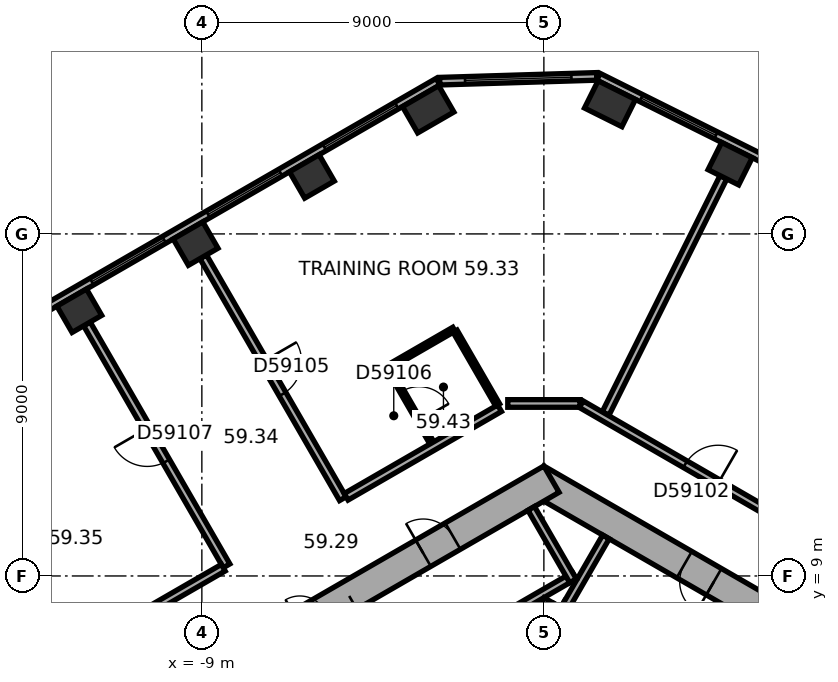
"""IFC4 building model, lengths in metres.
Left out: names, types, materials, properties, quantities, classifications, styles, units other than length and angle.
Written with IfcOpenShell. Run it as: python <this file> out.ifc"""

import sys

from ifc_helpers import new_model, si_unit, direction, frame, frame_2d, origin, origin_2d, place, context, subcontext, project, spatial, rectangle, extrude, element, fill, save


model = new_model("IFC4")
c1 = context("Model", 3, precision=1e-05, world=origin(), true_north=direction((0.0, 1.0)))
c2 = subcontext(c1, "Body", "Model", "MODEL_VIEW")
j1 = project(units=[si_unit("LENGTHUNIT", "METRE"), si_unit("PLANEANGLEUNIT", "RADIAN")], contexts=[c1])
p1 = place(None, origin())
s1 = spatial("IfcSite", under=j1, at=p1, CompositionType="ELEMENT")
p2 = place(p1, origin())
s2 = spatial("IfcBuilding", under=s1, at=p2, CompositionType="ELEMENT")
p3 = place(p2, frame((0.0, 0.0, 240.2)))
s3 = spatial("IfcBuildingStorey", under=s2, at=p3, CompositionType="ELEMENT", Elevation=240.2)
p4 = place(p3, frame((4.902, 19.848, 0.0), z_axis=(0.0, 0.0, 1.0), x_axis=(-0.894934361602, 0.44619781311, 0.0)))
e1 = element("IfcColumn", 1, at=p4, inside=s3, PredefinedType="COLUMN", context=c2, shape_type="SweptSolid", body=[
    extrude(rectangle(XDim=0.9, YDim=0.8, at=origin_2d()), origin(), (0.0, 0.0, 1.0), 3.7),
])
for number, where, z_axis, x_axis in (
    (2, (1.74, 21.425, 0.0), (0.0, 0.0, 1.0), (-0.895, 0.446, 0.0)),
    (3, (-3.044, 21.279, 0.0), (0.0, 0.0, 1.0), (-0.866, -0.5, 0.0)),
):
    element("IfcColumn", number, at=place(p3, frame(where, z_axis=z_axis, x_axis=x_axis)), inside=s3, PredefinedType="COLUMN", context=c2, shape_type="SweptSolid", body=[
        extrude(rectangle(XDim=1.1, YDim=0.8, at=origin_2d()), origin(), (0.0, 0.0, 1.0), 3.7),
    ])
for number, where, z_axis, x_axis in (
    (4, (-6.104, 19.512, 0.0), (0.0, 0.0, 1.0), (-0.866, -0.5, 0.0)),
    (5, (-9.165, 17.745, 0.0), (0.0, 0.0, 1.0), (-0.866, -0.5, 0.0)),
    (6, (-12.225, 15.978, 0.0), (0.0, 0.0, 1.0), (-0.866, -0.5, 0.0)),
):
    element("IfcColumn", number, at=place(p3, frame(where, z_axis=z_axis, x_axis=x_axis)), inside=s3, PredefinedType="COLUMN", context=c2, shape_type="SweptSolid", body=[
        extrude(rectangle(XDim=0.9, YDim=0.8, at=origin_2d()), origin(), (0.0, 0.0, 1.0), 3.7),
    ])
p5 = place(p3, frame((10.1, 5.6, 0.0), z_axis=(0.0, 0.0, 1.0), x_axis=(-0.866023897231, 0.500002609418, 0.0)))
e7 = element("IfcWall", 7, at=p5, inside=s3, PredefinedType="SHEAR", context=c2, shape_type="SweptSolid", body=[
    extrude(rectangle(XDim=11.894, YDim=0.8, at=frame_2d((5.947, 0.0))), origin(), (0.0, 0.0, 1.0), 3.7),
])
p6 = place(p5, frame((2.597, 0.0, 0.0)))
e8 = element("IfcOpeningElement", 8, at=p6, cuts=e7, PredefinedType="OPENING", context=c2, shape_type="SweptSolid", body=[
    extrude(rectangle(XDim=0.9, YDim=2.1, at=frame_2d((0.45, 1.05))), frame((0.0, 0.41, 0.0), z_axis=(0.0, -1.0, 0.0), x_axis=(1.0, 0.0, 0.0)), (0.0, 0.0, 1.0), 0.82),
])
p7 = place(p5, frame((6.497, 0.0, 0.0)))
e9 = element("IfcOpeningElement", 9, at=p7, cuts=e7, PredefinedType="OPENING", context=c2, shape_type="SweptSolid", body=[
    extrude(rectangle(XDim=0.9, YDim=2.1, at=frame_2d((0.45, 1.05))), frame((0.0, 0.41, 0.0), z_axis=(0.0, -1.0, 0.0), x_axis=(1.0, 0.0, 0.0)), (0.0, 0.0, 1.0), 0.82),
])
p8 = place(p3, frame((0.2, 11.547, 0.0), z_axis=(0.0, 0.0, 1.0), x_axis=(-0.866023897231, -0.500002609418, 0.0)))
e10 = element("IfcWall", 10, at=p8, inside=s3, PredefinedType="SHEAR", context=c2, shape_type="SweptSolid", body=[
    extrude(rectangle(XDim=11.894, YDim=0.8, at=frame_2d((5.947, 0.0))), origin(), (0.0, 0.0, 1.0), 3.7),
])
p9 = place(p8, frame((6.147, 0.0, 0.0)))
e11 = element("IfcOpeningElement", 11, at=p9, cuts=e10, PredefinedType="OPENING", context=c2, shape_type="SweptSolid", body=[
    extrude(rectangle(XDim=1.5, YDim=2.1, at=frame_2d((0.75, 1.05))), frame((0.0, 0.41, 0.0), z_axis=(0.0, -1.0, 0.0), x_axis=(1.0, 0.0, 0.0)), (0.0, 0.0, 1.0), 0.82),
])
p10 = place(p8, frame((2.997, 0.0, 0.0)))
e12 = element("IfcOpeningElement", 12, at=p10, cuts=e10, PredefinedType="OPENING", context=c2, shape_type="SweptSolid", body=[
    extrude(rectangle(XDim=0.9, YDim=2.1, at=frame_2d((0.45, 1.05))), frame((0.0, 0.41, 0.0), z_axis=(0.0, -1.0, 0.0), x_axis=(1.0, 0.0, 0.0)), (0.0, 0.0, 1.0), 0.82),
])
p11 = place(p3, frame((18.299, 13.727, 0.0), z_axis=(0.0, 0.0, 1.0), x_axis=(-0.894934554817, 0.44619742558, 0.0)))
e13 = element("IfcWall", 13, at=p11, inside=s3, PredefinedType="STANDARD", context=c2, shape_type="SweptSolid", body=[
    extrude(rectangle(XDim=18.841, YDim=0.2, at=frame_2d((9.421, 0.0))), origin(), (0.0, 0.0, 1.0), 3.7),
])
p12 = place(p11, frame((1.253, 0.0, 0.9)))
e14 = element("IfcOpeningElement", 14, at=p12, cuts=e13, PredefinedType="OPENING", context=c2, shape_type="SweptSolid", body=[
    extrude(rectangle(XDim=2.2, YDim=2.0, at=frame_2d((1.1, 1.0))), frame((0.0, 0.11, 0.0), z_axis=(0.0, -1.0, 0.0), x_axis=(1.0, 0.0, 0.0)), (0.0, 0.0, 1.0), 0.22),
])
p13 = place(p11, frame((4.786, 0.0, 0.9)))
e15 = element("IfcOpeningElement", 15, at=p13, cuts=e13, PredefinedType="OPENING", context=c2, shape_type="SweptSolid", body=[
    extrude(rectangle(XDim=2.2, YDim=2.0, at=frame_2d((1.1, 1.0))), frame((0.0, 0.11, 0.0), z_axis=(0.0, -1.0, 0.0), x_axis=(1.0, 0.0, 0.0)), (0.0, 0.0, 1.0), 0.22),
])
p14 = place(p11, frame((8.32, 0.0, 0.9)))
e16 = element("IfcOpeningElement", 16, at=p14, cuts=e13, PredefinedType="OPENING", context=c2, shape_type="SweptSolid", body=[
    extrude(rectangle(XDim=2.2, YDim=2.0, at=frame_2d((1.1, 1.0))), frame((0.0, 0.11, 0.0), z_axis=(0.0, -1.0, 0.0), x_axis=(1.0, 0.0, 0.0)), (0.0, 0.0, 1.0), 0.22),
])
p15 = place(p11, frame((11.854, 0.0, 0.9)))
e17 = element("IfcOpeningElement", 17, at=p15, cuts=e13, PredefinedType="OPENING", context=c2, shape_type="SweptSolid", body=[
    extrude(rectangle(XDim=2.2, YDim=2.0, at=frame_2d((1.1, 1.0))), frame((0.0, 0.11, 0.0), z_axis=(0.0, -1.0, 0.0), x_axis=(1.0, 0.0, 0.0)), (0.0, 0.0, 1.0), 0.22),
])
p16 = place(p11, frame((15.387, 0.0, 0.9)))
e18 = element("IfcOpeningElement", 18, at=p16, cuts=e13, PredefinedType="OPENING", context=c2, shape_type="SweptSolid", body=[
    extrude(rectangle(XDim=2.2, YDim=2.0, at=frame_2d((1.1, 1.0))), frame((0.0, 0.11, 0.0), z_axis=(0.0, -1.0, 0.0), x_axis=(1.0, 0.0, 0.0)), (0.0, 0.0, 1.0), 0.22),
])
p17 = place(p3, frame((1.389, 22.145, 0.0), z_axis=(0.0, 0.0, 1.0), x_axis=(-0.999534702881, -0.030502093955, 0.0)))
e19 = element("IfcWall", 19, at=p17, inside=s3, PredefinedType="STANDARD", context=c2, shape_type="SweptSolid", body=[
    extrude(rectangle(XDim=4.13, YDim=0.2, at=frame_2d((2.065, 0.0))), origin(), (0.0, 0.0, 1.0), 3.7),
])
p18 = place(p17, frame((0.665, 0.0, 0.9)))
e20 = element("IfcOpeningElement", 20, at=p18, cuts=e19, PredefinedType="OPENING", context=c2, shape_type="SweptSolid", body=[
    extrude(rectangle(XDim=2.8, YDim=2.0, at=frame_2d((1.4, 1.0))), frame((0.0, 0.11, 0.0), z_axis=(0.0, -1.0, 0.0), x_axis=(1.0, 0.0, 0.0)), (0.0, 0.0, 1.0), 0.22),
])
p19 = place(p3, frame((-2.786, 22.005, 0.0), z_axis=(0.0, 0.0, 1.0), x_axis=(-0.866026555358, -0.49999800541, 0.0)))
e21 = element("IfcWall", 21, at=p19, inside=s3, PredefinedType="STANDARD", context=c2, shape_type="SweptSolid", body=[
    extrude(rectangle(XDim=18.841, YDim=0.2, at=frame_2d((9.421, 0.0))), origin(), (0.0, 0.0, 1.0), 3.7),
])
p20 = place(p19, frame((1.254, 0.0, 0.9)))
e22 = element("IfcOpeningElement", 22, at=p20, cuts=e21, PredefinedType="OPENING", context=c2, shape_type="SweptSolid", body=[
    extrude(rectangle(XDim=2.2, YDim=2.0, at=frame_2d((1.1, 1.0))), frame((0.0, 0.11, 0.0), z_axis=(0.0, -1.0, 0.0), x_axis=(1.0, 0.0, 0.0)), (0.0, 0.0, 1.0), 0.22),
])
p21 = place(p19, frame((4.788, 0.0, 0.9)))
e23 = element("IfcOpeningElement", 23, at=p21, cuts=e21, PredefinedType="OPENING", context=c2, shape_type="SweptSolid", body=[
    extrude(rectangle(XDim=2.2, YDim=2.0, at=frame_2d((1.1, 1.0))), frame((0.0, 0.11, 0.0), z_axis=(0.0, -1.0, 0.0), x_axis=(1.0, 0.0, 0.0)), (0.0, 0.0, 1.0), 0.22),
])
p22 = place(p19, frame((8.321, 0.0, 0.9)))
e24 = element("IfcOpeningElement", 24, at=p22, cuts=e21, PredefinedType="OPENING", context=c2, shape_type="SweptSolid", body=[
    extrude(rectangle(XDim=2.2, YDim=2.0, at=frame_2d((1.1, 1.0))), frame((0.0, 0.11, 0.0), z_axis=(0.0, -1.0, 0.0), x_axis=(1.0, 0.0, 0.0)), (0.0, 0.0, 1.0), 0.22),
])
p23 = place(p19, frame((11.855, 0.0, 0.9)))
e25 = element("IfcOpeningElement", 25, at=p23, cuts=e21, PredefinedType="OPENING", context=c2, shape_type="SweptSolid", body=[
    extrude(rectangle(XDim=2.2, YDim=2.0, at=frame_2d((1.1, 1.0))), frame((0.0, 0.11, 0.0), z_axis=(0.0, -1.0, 0.0), x_axis=(1.0, 0.0, 0.0)), (0.0, 0.0, 1.0), 0.22),
])
p24 = place(p19, frame((15.389, 0.0, 0.9)))
e26 = element("IfcOpeningElement", 26, at=p24, cuts=e21, PredefinedType="OPENING", context=c2, shape_type="SweptSolid", body=[
    extrude(rectangle(XDim=2.2, YDim=2.0, at=frame_2d((1.1, 1.0))), frame((0.0, 0.11, 0.0), z_axis=(0.0, -1.0, 0.0), x_axis=(1.0, 0.0, 0.0)), (0.0, 0.0, 1.0), 0.22),
])
p25 = place(p3, frame((7.424, 4.259, 0.0), z_axis=(0.0, 0.0, 1.0), x_axis=(-0.866026010844, 0.49999894854, 0.0)))
e27 = element("IfcWall", 27, at=p25, inside=s3, PredefinedType="PARTITIONING", context=c2, shape_type="SweptSolid", body=[
    extrude(rectangle(XDim=8.0, YDim=0.2, at=frame_2d((4.0, 0.0))), origin(), (0.0, 0.0, 1.0), 3.42),
])
p26 = place(p3, frame((0.532, 8.122, 0.0), z_axis=(0.0, 0.0, 1.0), x_axis=(0.500077893725, 0.86598042715, 0.0)))
e28 = element("IfcWall", 28, at=p26, inside=s3, PredefinedType="PARTITIONING", context=c2, shape_type="SweptSolid", body=[
    extrude(rectangle(XDim=2.2, YDim=0.2, at=frame_2d((1.1, 0.0))), origin(), (0.0, 0.0, 1.0), 3.42),
])
p27 = place(p3, frame((0.803, 9.009, 0.0), z_axis=(0.0, 0.0, 1.0), x_axis=(-0.866028230842, -0.499995103361, 0.0)))
e29 = element("IfcWall", 29, at=p27, inside=s3, PredefinedType="PARTITIONING", context=c2, shape_type="SweptSolid", body=[
    extrude(rectangle(XDim=5.4, YDim=0.2, at=frame_2d((2.7, 0.0))), origin(), (0.0, 0.0, 1.0), 3.42),
])
p28 = place(p3, frame((0.767, 8.872, 0.0), z_axis=(0.0, 0.0, 1.0), x_axis=(-0.499994660107, 0.866028486751, 0.0)))
e30 = element("IfcWall", 30, at=p28, inside=s3, PredefinedType="PARTITIONING", context=c2, shape_type="SweptSolid", body=[
    extrude(rectangle(XDim=2.2, YDim=0.2, at=frame_2d((1.1, 0.0))), origin(), (0.0, 0.0, 1.0), 3.42),
])
p29 = place(p3, frame((-2.216, 4.282, 0.0), z_axis=(0.0, 0.0, 1.0), x_axis=(0.499977259774, 0.866038532462, 0.0)))
e31 = element("IfcWall", 31, at=p29, inside=s3, PredefinedType="SHEAR", context=c2, shape_type="SweptSolid", body=[
    extrude(rectangle(XDim=4.7, YDim=0.3, at=frame_2d((2.35, 0.0))), origin(), (0.0, 0.0, 1.0), 3.42),
])
p30 = place(p3, frame((-12.025, 15.632, 0.0), z_axis=(0.0, 0.0, 1.0), x_axis=(0.499983153418, -0.866035129944, 0.0)))
e32 = element("IfcWall", 32, at=p30, inside=s3, PredefinedType="PARTITIONING", context=c2, shape_type="SweptSolid", body=[
    extrude(rectangle(XDim=7.35, YDim=0.2, at=frame_2d((3.675, 0.0))), origin(), (0.0, 0.0, 1.0), 3.42),
])
p31 = place(p30, frame((3.175, 0.0, 0.0)))
e33 = element("IfcOpeningElement", 33, at=p31, cuts=e32, PredefinedType="OPENING", context=c2, shape_type="SweptSolid", body=[
    extrude(rectangle(XDim=1.0, YDim=2.1, at=frame_2d((0.5, 1.05))), frame((0.0, 0.11, 0.0), z_axis=(0.0, -1.0, 0.0), x_axis=(1.0, 0.0, 0.0)), (0.0, 0.0, 1.0), 0.22),
])
p32 = place(p3, frame((-8.965, 17.399, 0.0), z_axis=(0.0, 0.0, 1.0), x_axis=(0.499993683172, -0.866029050776, 0.0)))
e34 = element("IfcWall", 34, at=p32, inside=s3, PredefinedType="PARTITIONING", context=c2, shape_type="SweptSolid", body=[
    extrude(rectangle(XDim=7.35, YDim=0.2, at=frame_2d((3.675, 0.0))), origin(), (0.0, 0.0, 1.0), 2.87),
])
p33 = place(p32, frame((3.175, 0.0, 0.0)))
e35 = element("IfcOpeningElement", 35, at=p33, cuts=e34, PredefinedType="OPENING", context=c2, shape_type="SweptSolid", body=[
    extrude(rectangle(XDim=1.0, YDim=2.1, at=frame_2d((0.5, 1.05))), frame((0.0, 0.11, 0.0), z_axis=(0.0, -1.0, 0.0), x_axis=(1.0, 0.0, 0.0)), (0.0, 0.0, 1.0), 0.22),
])
p34 = place(p3, frame((-8.437, 9.217, 0.0), z_axis=(0.0, 0.0, 1.0), x_axis=(-0.866005660673, -0.500034194513, 0.0)))
e36 = element("IfcWall", 36, at=p34, inside=s3, PredefinedType="PARTITIONING", context=c2, shape_type="SweptSolid", body=[
    extrude(rectangle(XDim=3.209, YDim=0.2, at=frame_2d((1.604, 0.0))), origin(), (0.0, 0.0, 1.0), 3.42),
])
p35 = place(p3, frame((-4.099, 14.492, 0.0), z_axis=(0.0, 0.0, 1.0), x_axis=(0.866041268327, 0.499972520799, 0.0)))
e37 = element("IfcWall", 37, at=p35, inside=s3, PredefinedType="PARTITIONING", context=c2, shape_type="SweptSolid", body=[
    extrude(rectangle(XDim=2.0, YDim=0.12, at=frame_2d((1.0, 0.0))), origin(), (0.0, 0.0, 1.0), 3.42),
])
p36 = place(p3, frame((-2.948, 12.5, 0.0), z_axis=(0.0, 0.0, 1.0), x_axis=(-0.500077830873, 0.865980463445, 0.0)))
e38 = element("IfcWall", 38, at=p36, inside=s3, PredefinedType="PARTITIONING", context=c2, shape_type="SweptSolid", body=[
    extrude(rectangle(XDim=2.24, YDim=0.12, at=frame_2d((1.12, 0.0))), origin(), (0.0, 0.0, 1.0), 3.42),
])
p37 = place(p36, frame((0.67, 0.0, 0.0)))
e39 = element("IfcOpeningElement", 39, at=p37, cuts=e38, PredefinedType="OPENING", context=c2, shape_type="SweptSolid", body=[
    extrude(rectangle(XDim=0.9, YDim=2.1, at=frame_2d((0.45, 1.05))), frame((0.0, 0.07, 0.0), z_axis=(0.0, -1.0, 0.0), x_axis=(1.0, 0.0, 0.0)), (0.0, 0.0, 1.0), 0.14),
])
p38 = place(p3, frame((-2.336, 15.44, 0.0), z_axis=(0.0, 0.0, 1.0), x_axis=(0.49999608499, -0.866027664105, 0.0)))
e40 = element("IfcWall", 40, at=p38, inside=s3, PredefinedType="PARTITIONING", context=c2, shape_type="SweptSolid", body=[
    extrude(rectangle(XDim=2.24, YDim=0.12, at=frame_2d((1.12, 0.0))), origin(), (0.0, 0.0, 1.0), 3.42),
])
p39 = place(p3, frame((-1.167, 13.414, 0.0), z_axis=(0.0, 0.0, 1.0), x_axis=(-0.866023347809, -0.500003561037, 0.0)))
e41 = element("IfcWall", 41, at=p39, inside=s3, PredefinedType="PARTITIONING", context=c2, shape_type="SweptSolid", body=[
    extrude(rectangle(XDim=4.661, YDim=0.2, at=frame_2d((2.331, 0.0))), origin(), (0.0, 0.0, 1.0), 3.42),
])
p40 = place(p3, frame((0.95, 13.539, 0.0), z_axis=(0.0, 0.0, 1.0), x_axis=(-1.0, 0.0, 0.0)))
e42 = element("IfcWall", 42, at=p40, inside=s3, PredefinedType="PARTITIONING", context=c2, shape_type="SweptSolid", body=[
    extrude(rectangle(XDim=1.9, YDim=0.2, at=frame_2d((0.95, 0.0))), origin(), (0.0, 0.0, 1.0), 3.42),
])
p41 = place(p3, frame((4.723, 19.49, 0.0), z_axis=(0.0, 0.0, 1.0), x_axis=(-0.446186614574, -0.894939944898, 0.0)))
e43 = element("IfcWall", 43, at=p41, inside=s3, PredefinedType="PARTITIONING", context=c2, shape_type="SweptSolid", body=[
    extrude(rectangle(XDim=6.944, YDim=0.2, at=frame_2d((3.472, 0.0))), origin(), (0.0, 0.0, 1.0), 2.87),
])
p42 = place(p3, frame((9.198, 8.777, 0.0), z_axis=(0.0, 0.0, 1.0), x_axis=(-0.866026106692, 0.499998782526, 0.0)))
e44 = element("IfcWall", 44, at=p42, inside=s3, PredefinedType="PARTITIONING", context=c2, shape_type="SweptSolid", body=[
    extrude(rectangle(XDim=9.483, YDim=0.2, at=frame_2d((4.742, 0.0))), origin(), (0.0, 0.0, 1.0), 3.42),
])
p43 = place(p42, frame((5.325, 0.0, 0.0)))
e45 = element("IfcOpeningElement", 45, at=p43, cuts=e44, PredefinedType="OPENING", context=c2, shape_type="SweptSolid", body=[
    extrude(rectangle(XDim=1.0, YDim=2.1, at=frame_2d((0.5, 1.05))), frame((0.0, 0.11, 0.0), z_axis=(0.0, -1.0, 0.0), x_axis=(1.0, 0.0, 0.0)), (0.0, 0.0, 1.0), 0.22),
])
p44 = place(p16, origin())
e46 = element("IfcWindow", 46, at=p44, inside=s3, PartitioningType="SINGLE_PANEL", PredefinedType="WINDOW", context=c2, shape_type="SweptSolid", body=[
    extrude(rectangle(XDim=2.2, YDim=2.0, at=frame_2d((1.1, 1.0))), frame((0.0, 0.03, 0.0), z_axis=(0.0, -1.0, 0.0), x_axis=(1.0, 0.0, 0.0)), (0.0, 0.0, 1.0), 0.06),
])
fill(e18, e46)
p45 = place(p18, origin())
e47 = element("IfcWindow", 47, at=p45, inside=s3, PartitioningType="SINGLE_PANEL", PredefinedType="WINDOW", context=c2, shape_type="SweptSolid", body=[
    extrude(rectangle(XDim=2.8, YDim=2.0, at=frame_2d((1.4, 1.0))), frame((0.0, 0.03, 0.0), z_axis=(0.0, -1.0, 0.0), x_axis=(1.0, 0.0, 0.0)), (0.0, 0.0, 1.0), 0.06),
])
fill(e20, e47)
p46 = place(p20, origin())
e48 = element("IfcWindow", 48, at=p46, inside=s3, PartitioningType="SINGLE_PANEL", PredefinedType="WINDOW", context=c2, shape_type="SweptSolid", body=[
    extrude(rectangle(XDim=2.2, YDim=2.0, at=frame_2d((1.1, 1.0))), frame((0.0, 0.03, 0.0), z_axis=(0.0, -1.0, 0.0), x_axis=(1.0, 0.0, 0.0)), (0.0, 0.0, 1.0), 0.06),
])
fill(e22, e48)
p47 = place(p21, origin())
e49 = element("IfcWindow", 49, at=p47, inside=s3, PartitioningType="SINGLE_PANEL", PredefinedType="WINDOW", context=c2, shape_type="SweptSolid", body=[
    extrude(rectangle(XDim=2.2, YDim=2.0, at=frame_2d((1.1, 1.0))), frame((0.0, 0.03, 0.0), z_axis=(0.0, -1.0, 0.0), x_axis=(1.0, 0.0, 0.0)), (0.0, 0.0, 1.0), 0.06),
])
fill(e23, e49)
p48 = place(p22, origin())
e50 = element("IfcWindow", 50, at=p48, inside=s3, PartitioningType="SINGLE_PANEL", PredefinedType="WINDOW", context=c2, shape_type="SweptSolid", body=[
    extrude(rectangle(XDim=2.2, YDim=2.0, at=frame_2d((1.1, 1.0))), frame((0.0, 0.03, 0.0), z_axis=(0.0, -1.0, 0.0), x_axis=(1.0, 0.0, 0.0)), (0.0, 0.0, 1.0), 0.06),
])
fill(e24, e50)
p49 = place(p9, origin())
e51 = element("IfcDoor", 51, at=p49, inside=s3, OperationType="DOUBLE_DOOR_SINGLE_SWING", PredefinedType="DOOR", context=c2, shape_type="SweptSolid", body=[
    extrude(rectangle(XDim=1.5, YDim=2.1, at=frame_2d((0.75, 1.05))), frame((0.0, 0.025, 0.0), z_axis=(0.0, -1.0, 0.0), x_axis=(1.0, 0.0, 0.0)), (0.0, 0.0, 1.0), 0.05),
])
fill(e11, e51)
p50 = place(p7, origin())
e52 = element("IfcDoor", 52, at=p50, inside=s3, OperationType="SINGLE_SWING_LEFT", PredefinedType="DOOR", context=c2, shape_type="SweptSolid", body=[
    extrude(rectangle(XDim=0.9, YDim=2.1, at=frame_2d((0.45, 1.05))), frame((0.0, 0.025, 0.0), z_axis=(0.0, -1.0, 0.0), x_axis=(1.0, 0.0, 0.0)), (0.0, 0.0, 1.0), 0.05),
])
fill(e9, e52)
p51 = place(p10, origin())
e53 = element("IfcDoor", 53, at=p51, inside=s3, OperationType="SINGLE_SWING_LEFT", PredefinedType="DOOR", context=c2, shape_type="SweptSolid", body=[
    extrude(rectangle(XDim=0.9, YDim=2.1, at=frame_2d((0.45, 1.05))), frame((0.0, 0.025, 0.0), z_axis=(0.0, -1.0, 0.0), x_axis=(1.0, 0.0, 0.0)), (0.0, 0.0, 1.0), 0.05),
])
fill(e12, e53)
p52 = place(p43, origin())
e54 = element("IfcDoor", 54, at=p52, inside=s3, OperationType="SINGLE_SWING_LEFT", PredefinedType="DOOR", context=c2, shape_type="SweptSolid", body=[
    extrude(rectangle(XDim=1.0, YDim=2.1, at=frame_2d((0.5, 1.05))), frame((0.0, 0.025, 0.0), z_axis=(0.0, -1.0, 0.0), x_axis=(1.0, 0.0, 0.0)), (0.0, 0.0, 1.0), 0.05),
])
fill(e45, e54)
p53 = place(p33, origin())
e55 = element("IfcDoor", 55, at=p53, inside=s3, OperationType="SINGLE_SWING_LEFT", PredefinedType="DOOR", context=c2, shape_type="SweptSolid", body=[
    extrude(rectangle(XDim=1.0, YDim=2.1, at=frame_2d((0.5, 1.05))), frame((0.0, 0.025, 0.0), z_axis=(0.0, -1.0, 0.0), x_axis=(1.0, 0.0, 0.0)), (0.0, 0.0, 1.0), 0.05),
])
fill(e35, e55)
p54 = place(p37, origin())
e56 = element("IfcDoor", 56, at=p54, inside=s3, OperationType="SINGLE_SWING_LEFT", PredefinedType="DOOR", context=c2, shape_type="SweptSolid", body=[
    extrude(rectangle(XDim=0.9, YDim=2.1, at=frame_2d((0.45, 1.05))), frame((0.0, 0.025, 0.0), z_axis=(0.0, -1.0, 0.0), x_axis=(1.0, 0.0, 0.0)), (0.0, 0.0, 1.0), 0.05),
])
fill(e39, e56)
p55 = place(p31, origin())
e57 = element("IfcDoor", 57, at=p55, inside=s3, OperationType="SINGLE_SWING_LEFT", PredefinedType="DOOR", context=c2, shape_type="SweptSolid", body=[
    extrude(rectangle(XDim=1.0, YDim=2.1, at=frame_2d((0.5, 1.05))), frame((0.0, 0.025, 0.0), z_axis=(0.0, -1.0, 0.0), x_axis=(1.0, 0.0, 0.0)), (0.0, 0.0, 1.0), 0.05),
])
fill(e33, e57)
save(model, sys.argv[1])
